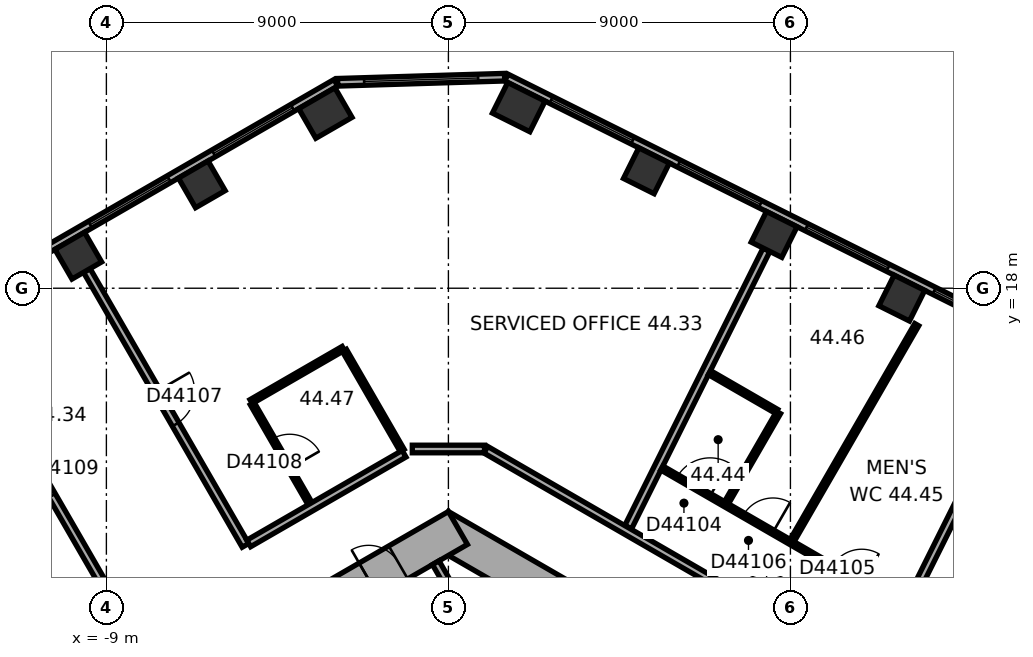
"""IFC4 building model, lengths in metres.
Left out: names, types, materials, properties, quantities, classifications, styles, units other than length and angle.
Written with IfcOpenShell. Run it as: python <this file> out.ifc"""

import sys

from ifc_helpers import new_model, si_unit, direction, frame, frame_2d, origin, origin_2d, place, context, subcontext, project, spatial, rectangle, extrude, element, fill, save


model = new_model("IFC4")
c1 = context("Model", 3, precision=1e-05, world=origin(), true_north=direction((0.0, 1.0)))
c2 = subcontext(c1, "Body", "Model", "MODEL_VIEW")
j1 = project(units=[si_unit("LENGTHUNIT", "METRE"), si_unit("PLANEANGLEUNIT", "RADIAN")], contexts=[c1])
p1 = place(None, origin())
s1 = spatial("IfcSite", under=j1, at=p1, CompositionType="ELEMENT")
p2 = place(p1, origin())
s2 = spatial("IfcBuilding", under=s1, at=p2, CompositionType="ELEMENT")
p3 = place(p2, frame((0.0, 0.0, 179.9)))
s3 = spatial("IfcBuildingStorey", under=s2, at=p3, CompositionType="ELEMENT", Elevation=179.9)
for number, where, z_axis, x_axis in (
    (1, (11.931, 17.74, 0.0), (0.0, 0.0, 1.0), (-0.895, 0.446, 0.0)),
    (2, (8.571, 19.416, 0.0), (0.0, 0.0, 1.0), (-0.895, 0.446, 0.0)),
    (3, (5.211, 21.091, 0.0), (0.0, 0.0, 1.0), (-0.895, 0.446, 0.0)),
):
    element("IfcColumn", number, at=place(p3, frame(where, z_axis=z_axis, x_axis=x_axis)), inside=s3, PredefinedType="COLUMN", context=c2, shape_type="SweptSolid", body=[
        extrude(rectangle(XDim=0.9, YDim=0.9, at=origin_2d()), origin(), (0.0, 0.0, 1.0), 3.7),
    ])
for number, where, z_axis, x_axis in (
    (4, (1.852, 22.766, 0.0), (0.0, 0.0, 1.0), (-0.895, 0.446, 0.0)),
    (5, (-3.238, 22.61, 0.0), (0.0, 0.0, 1.0), (-0.866, -0.5, 0.0)),
):
    element("IfcColumn", number, at=place(p3, frame(where, z_axis=z_axis, x_axis=x_axis)), inside=s3, PredefinedType="COLUMN", context=c2, shape_type="SweptSolid", body=[
        extrude(rectangle(XDim=1.1, YDim=0.9, at=origin_2d()), origin(), (0.0, 0.0, 1.0), 3.7),
    ])
for number, where, z_axis, x_axis in (
    (6, (-6.489, 20.733, 0.0), (0.0, 0.0, 1.0), (-0.866, -0.5, 0.0)),
    (7, (-9.74, 18.856, 0.0), (0.0, 0.0, 1.0), (-0.866, -0.5, 0.0)),
):
    element("IfcColumn", number, at=place(p3, frame(where, z_axis=z_axis, x_axis=x_axis)), inside=s3, PredefinedType="COLUMN", context=c2, shape_type="SweptSolid", body=[
        extrude(rectangle(XDim=0.9, YDim=0.9, at=origin_2d()), origin(), (0.0, 0.0, 1.0), 3.7),
    ])
p4 = place(p3, frame((10.25, 5.629, 0.0), z_axis=(0.0, 0.0, 1.0), x_axis=(-0.866022616891, 0.50000482701, 0.0)))
e8 = element("IfcWall", 8, at=p4, inside=s3, PredefinedType="SHEAR", context=c2, shape_type="SweptSolid", body=[
    extrude(rectangle(XDim=12.125, YDim=1.0, at=frame_2d((6.062, 0.0))), origin(), (0.0, 0.0, 1.0), 3.7),
])
p5 = place(p4, frame((5.312, 0.0, 0.0)))
e9 = element("IfcOpeningElement", 9, at=p5, cuts=e8, PredefinedType="OPENING", context=c2, shape_type="SweptSolid", body=[
    extrude(rectangle(XDim=0.9, YDim=2.1, at=frame_2d((0.45, 1.05))), frame((0.0, 0.51, 0.0), z_axis=(0.0, -1.0, 0.0), x_axis=(1.0, 0.0, 0.0)), (0.0, 0.0, 1.0), 1.02),
])
p6 = place(p3, frame((0.25, 11.691, 0.0), z_axis=(0.0, 0.0, 1.0), x_axis=(-0.866022616891, -0.50000482701, 0.0)))
e10 = element("IfcWall", 10, at=p6, inside=s3, PredefinedType="SHEAR", context=c2, shape_type="SweptSolid", body=[
    extrude(rectangle(XDim=12.125, YDim=1.0, at=frame_2d((6.062, 0.0))), origin(), (0.0, 0.0, 1.0), 3.7),
])
p7 = place(p6, frame((6.262, 0.0, 0.0)))
e11 = element("IfcOpeningElement", 11, at=p7, cuts=e10, PredefinedType="OPENING", context=c2, shape_type="SweptSolid", body=[
    extrude(rectangle(XDim=1.5, YDim=2.1, at=frame_2d((0.75, 1.05))), frame((0.0, 0.51, 0.0), z_axis=(0.0, -1.0, 0.0), x_axis=(1.0, 0.0, 0.0)), (0.0, 0.0, 1.0), 1.02),
])
p8 = place(p6, frame((1.812, 0.0, 0.0)))
e12 = element("IfcOpeningElement", 12, at=p8, cuts=e10, PredefinedType="OPENING", context=c2, shape_type="SweptSolid", body=[
    extrude(rectangle(XDim=0.9, YDim=2.1, at=frame_2d((0.45, 1.05))), frame((0.0, 0.51, 0.0), z_axis=(0.0, -1.0, 0.0), x_axis=(1.0, 0.0, 0.0)), (0.0, 0.0, 1.0), 1.02),
])
p9 = place(p6, frame((4.412, 0.0, 0.0)))
e13 = element("IfcOpeningElement", 13, at=p9, cuts=e10, PredefinedType="OPENING", context=c2, shape_type="SweptSolid", body=[
    extrude(rectangle(XDim=0.9, YDim=2.1, at=frame_2d((0.45, 1.05))), frame((0.0, 0.51, 0.0), z_axis=(0.0, -1.0, 0.0), x_axis=(1.0, 0.0, 0.0)), (0.0, 0.0, 1.0), 1.02),
])
p10 = place(p3, frame((19.464, 14.599, 0.0), z_axis=(0.0, 0.0, 1.0), x_axis=(-0.894935755043, 0.446195018289, 0.0)))
e14 = element("IfcWall", 14, at=p10, inside=s3, PredefinedType="STANDARD", context=c2, shape_type="SweptSolid", body=[
    extrude(rectangle(XDim=20.044, YDim=0.2, at=frame_2d((10.022, 0.0))), origin(), (0.0, 0.0, 1.0), 3.7),
])
p11 = place(p10, frame((1.313, 0.0, 0.9)))
e15 = element("IfcOpeningElement", 15, at=p11, cuts=e14, PredefinedType="OPENING", context=c2, shape_type="SweptSolid", body=[
    extrude(rectangle(XDim=2.4, YDim=2.0, at=frame_2d((1.2, 1.0))), frame((0.0, 0.11, 0.0), z_axis=(0.0, -1.0, 0.0), x_axis=(1.0, 0.0, 0.0)), (0.0, 0.0, 1.0), 0.22),
])
p12 = place(p10, frame((5.067, 0.0, 0.9)))
e16 = element("IfcOpeningElement", 16, at=p12, cuts=e14, PredefinedType="OPENING", context=c2, shape_type="SweptSolid", body=[
    extrude(rectangle(XDim=2.4, YDim=2.0, at=frame_2d((1.2, 1.0))), frame((0.0, 0.11, 0.0), z_axis=(0.0, -1.0, 0.0), x_axis=(1.0, 0.0, 0.0)), (0.0, 0.0, 1.0), 0.22),
])
p13 = place(p10, frame((8.821, 0.0, 0.9)))
e17 = element("IfcOpeningElement", 17, at=p13, cuts=e14, PredefinedType="OPENING", context=c2, shape_type="SweptSolid", body=[
    extrude(rectangle(XDim=2.4, YDim=2.0, at=frame_2d((1.2, 1.0))), frame((0.0, 0.11, 0.0), z_axis=(0.0, -1.0, 0.0), x_axis=(1.0, 0.0, 0.0)), (0.0, 0.0, 1.0), 0.22),
])
p14 = place(p10, frame((12.575, 0.0, 0.9)))
e18 = element("IfcOpeningElement", 18, at=p14, cuts=e14, PredefinedType="OPENING", context=c2, shape_type="SweptSolid", body=[
    extrude(rectangle(XDim=2.4, YDim=2.0, at=frame_2d((1.2, 1.0))), frame((0.0, 0.11, 0.0), z_axis=(0.0, -1.0, 0.0), x_axis=(1.0, 0.0, 0.0)), (0.0, 0.0, 1.0), 0.22),
])
p15 = place(p10, frame((16.329, 0.0, 0.9)))
e19 = element("IfcOpeningElement", 19, at=p15, cuts=e14, PredefinedType="OPENING", context=c2, shape_type="SweptSolid", body=[
    extrude(rectangle(XDim=2.4, YDim=2.0, at=frame_2d((1.2, 1.0))), frame((0.0, 0.11, 0.0), z_axis=(0.0, -1.0, 0.0), x_axis=(1.0, 0.0, 0.0)), (0.0, 0.0, 1.0), 0.22),
])
p16 = place(p3, frame((1.479, 23.553, 0.0), z_axis=(0.0, 0.0, 1.0), x_axis=(-0.999534786117, -0.03049936625, 0.0)))
e20 = element("IfcWall", 20, at=p16, inside=s3, PredefinedType="STANDARD", context=c2, shape_type="SweptSolid", body=[
    extrude(rectangle(XDim=4.395, YDim=0.2, at=frame_2d((2.197, 0.0))), origin(), (0.0, 0.0, 1.0), 3.7),
])
p17 = place(p16, frame((0.698, 0.0, 0.9)))
e21 = element("IfcOpeningElement", 21, at=p17, cuts=e20, PredefinedType="OPENING", context=c2, shape_type="SweptSolid", body=[
    extrude(rectangle(XDim=3.0, YDim=2.0, at=frame_2d((1.5, 1.0))), frame((0.0, 0.11, 0.0), z_axis=(0.0, -1.0, 0.0), x_axis=(1.0, 0.0, 0.0)), (0.0, 0.0, 1.0), 0.22),
])
p18 = place(p3, frame((-2.961, 23.405, 0.0), z_axis=(0.0, 0.0, 1.0), x_axis=(-0.866023315909, -0.500003616288, 0.0)))
e22 = element("IfcWall", 22, at=p18, inside=s3, PredefinedType="STANDARD", context=c2, shape_type="SweptSolid", body=[
    extrude(rectangle(XDim=20.044, YDim=0.2, at=frame_2d((10.022, 0.0))), origin(), (0.0, 0.0, 1.0), 3.7),
])
p19 = place(p18, frame((1.314, 0.0, 0.9)))
e23 = element("IfcOpeningElement", 23, at=p19, cuts=e22, PredefinedType="OPENING", context=c2, shape_type="SweptSolid", body=[
    extrude(rectangle(XDim=2.4, YDim=2.0, at=frame_2d((1.2, 1.0))), frame((0.0, 0.11, 0.0), z_axis=(0.0, -1.0, 0.0), x_axis=(1.0, 0.0, 0.0)), (0.0, 0.0, 1.0), 0.22),
])
p20 = place(p18, frame((5.069, 0.0, 0.9)))
e24 = element("IfcOpeningElement", 24, at=p20, cuts=e22, PredefinedType="OPENING", context=c2, shape_type="SweptSolid", body=[
    extrude(rectangle(XDim=2.4, YDim=2.0, at=frame_2d((1.2, 1.0))), frame((0.0, 0.11, 0.0), z_axis=(0.0, -1.0, 0.0), x_axis=(1.0, 0.0, 0.0)), (0.0, 0.0, 1.0), 0.22),
])
p21 = place(p18, frame((8.823, 0.0, 0.9)))
e25 = element("IfcOpeningElement", 25, at=p21, cuts=e22, PredefinedType="OPENING", context=c2, shape_type="SweptSolid", body=[
    extrude(rectangle(XDim=2.4, YDim=2.0, at=frame_2d((1.2, 1.0))), frame((0.0, 0.11, 0.0), z_axis=(0.0, -1.0, 0.0), x_axis=(1.0, 0.0, 0.0)), (0.0, 0.0, 1.0), 0.22),
])
p22 = place(p18, frame((12.577, 0.0, 0.9)))
e26 = element("IfcOpeningElement", 26, at=p22, cuts=e22, PredefinedType="OPENING", context=c2, shape_type="SweptSolid", body=[
    extrude(rectangle(XDim=2.4, YDim=2.0, at=frame_2d((1.2, 1.0))), frame((0.0, 0.11, 0.0), z_axis=(0.0, -1.0, 0.0), x_axis=(1.0, 0.0, 0.0)), (0.0, 0.0, 1.0), 0.22),
])
p23 = place(p18, frame((16.331, 0.0, 0.9)))
e27 = element("IfcOpeningElement", 27, at=p23, cuts=e22, PredefinedType="OPENING", context=c2, shape_type="SweptSolid", body=[
    extrude(rectangle(XDim=2.4, YDim=2.0, at=frame_2d((1.2, 1.0))), frame((0.0, 0.11, 0.0), z_axis=(0.0, -1.0, 0.0), x_axis=(1.0, 0.0, 0.0)), (0.0, 0.0, 1.0), 0.22),
])
p24 = place(p3, frame((0.767, 8.872, 0.0), z_axis=(0.0, 0.0, 1.0), x_axis=(-0.499994660107, 0.866028486751, 0.0)))
e28 = element("IfcWall", 28, at=p24, inside=s3, PredefinedType="PARTITIONING", context=c2, shape_type="SweptSolid", body=[
    extrude(rectangle(XDim=2.2, YDim=0.2, at=frame_2d((1.1, 0.0))), origin(), (0.0, 0.0, 1.0), 3.42),
])
p25 = place(p3, frame((-12.766, 16.589, 0.0), z_axis=(0.0, 0.0, 1.0), x_axis=(0.500010139422, -0.866019549707, 0.0)))
e29 = element("IfcWall", 29, at=p25, inside=s3, PredefinedType="PARTITIONING", context=c2, shape_type="SweptSolid", body=[
    extrude(rectangle(XDim=8.35, YDim=0.2, at=frame_2d((4.175, 0.0))), origin(), (0.0, 0.0, 1.0), 3.42),
])
p26 = place(p25, frame((3.675, 0.0, 0.0)))
e30 = element("IfcOpeningElement", 30, at=p26, cuts=e29, PredefinedType="OPENING", context=c2, shape_type="SweptSolid", body=[
    extrude(rectangle(XDim=1.0, YDim=2.1, at=frame_2d((0.5, 1.05))), frame((0.0, 0.11, 0.0), z_axis=(0.0, -1.0, 0.0), x_axis=(1.0, 0.0, 0.0)), (0.0, 0.0, 1.0), 0.22),
])
p27 = place(p3, frame((-9.515, 18.466, 0.0), z_axis=(0.0, 0.0, 1.0), x_axis=(0.500010139422, -0.866019549707, 0.0)))
e31 = element("IfcWall", 31, at=p27, inside=s3, PredefinedType="PARTITIONING", context=c2, shape_type="SweptSolid", body=[
    extrude(rectangle(XDim=8.35, YDim=0.2, at=frame_2d((4.175, 0.0))), origin(), (0.0, 0.0, 1.0), 2.87),
])
p28 = place(p27, frame((3.675, 0.0, 0.0)))
e32 = element("IfcOpeningElement", 32, at=p28, cuts=e31, PredefinedType="OPENING", context=c2, shape_type="SweptSolid", body=[
    extrude(rectangle(XDim=1.0, YDim=2.1, at=frame_2d((0.5, 1.05))), frame((0.0, 0.11, 0.0), z_axis=(0.0, -1.0, 0.0), x_axis=(1.0, 0.0, 0.0)), (0.0, 0.0, 1.0), 0.22),
])
p29 = place(p3, frame((-5.191, 15.016, 0.0), z_axis=(0.0, 0.0, 1.0), x_axis=(0.866034573852, 0.49998411664, 0.0)))
e33 = element("IfcWall", 33, at=p29, inside=s3, PredefinedType="PARTITIONING", context=c2, shape_type="SweptSolid", body=[
    extrude(rectangle(XDim=2.8, YDim=0.12, at=frame_2d((1.4, 0.0))), origin(), (0.0, 0.0, 1.0), 3.42),
])
p30 = place(p3, frame((-3.641, 12.331, 0.0), z_axis=(0.0, 0.0, 1.0), x_axis=(-0.499991248344, 0.866030456496, 0.0)))
e34 = element("IfcWall", 34, at=p30, inside=s3, PredefinedType="PARTITIONING", context=c2, shape_type="SweptSolid", body=[
    extrude(rectangle(XDim=3.04, YDim=0.12, at=frame_2d((1.52, 0.0))), origin(), (0.0, 0.0, 1.0), 3.42),
])
p31 = place(p30, frame((1.07, 0.0, 0.0)))
e35 = element("IfcOpeningElement", 35, at=p31, cuts=e34, PredefinedType="OPENING", context=c2, shape_type="SweptSolid", body=[
    extrude(rectangle(XDim=0.9, YDim=2.1, at=frame_2d((0.45, 1.05))), frame((0.0, 0.07, 0.0), z_axis=(0.0, -1.0, 0.0), x_axis=(1.0, 0.0, 0.0)), (0.0, 0.0, 1.0), 0.14),
])
p32 = place(p3, frame((-2.737, 16.364, 0.0), z_axis=(0.0, 0.0, 1.0), x_axis=(0.500026023896, -0.86601037836, 0.0)))
e36 = element("IfcWall", 36, at=p32, inside=s3, PredefinedType="PARTITIONING", context=c2, shape_type="SweptSolid", body=[
    extrude(rectangle(XDim=3.04, YDim=0.12, at=frame_2d((1.52, 0.0))), origin(), (0.0, 0.0, 1.0), 3.42),
])
p33 = place(p3, frame((-1.167, 13.645, 0.0), z_axis=(0.0, 0.0, 1.0), x_axis=(-0.866034830959, -0.499983671299, 0.0)))
e37 = element("IfcWall", 37, at=p33, inside=s3, PredefinedType="PARTITIONING", context=c2, shape_type="SweptSolid", body=[
    extrude(rectangle(XDim=4.719, YDim=0.2, at=frame_2d((2.36, 0.0))), origin(), (0.0, 0.0, 1.0), 3.42),
])
p34 = place(p3, frame((0.95, 13.77, 0.0), z_axis=(0.0, 0.0, 1.0), x_axis=(-1.0, 0.0, 0.0)))
e38 = element("IfcWall", 38, at=p34, inside=s3, PredefinedType="PARTITIONING", context=c2, shape_type="SweptSolid", body=[
    extrude(rectangle(XDim=1.9, YDim=0.2, at=frame_2d((0.95, 0.0))), origin(), (0.0, 0.0, 1.0), 3.42),
])
p35 = place(p3, frame((7.318, 12.356, 0.0), z_axis=(0.0, 0.0, 1.0), x_axis=(0.499982138324, 0.866035715982, 0.0)))
e39 = element("IfcWall", 39, at=p35, inside=s3, PredefinedType="PARTITIONING", context=c2, shape_type="SweptSolid", body=[
    extrude(rectangle(XDim=2.74, YDim=0.12, at=frame_2d((1.37, 0.0))), origin(), (0.0, 0.0, 1.0), 3.42),
])
p36 = place(p3, frame((8.37, 19.013, 0.0), z_axis=(0.0, 0.0, 1.0), x_axis=(-0.446183598632, -0.894941448538, 0.0)))
e40 = element("IfcWall", 40, at=p36, inside=s3, PredefinedType="PARTITIONING", context=c2, shape_type="SweptSolid", body=[
    extrude(rectangle(XDim=8.156, YDim=0.2, at=frame_2d((4.078, 0.0))), origin(), (0.0, 0.0, 1.0), 3.42),
])
p37 = place(p3, frame((8.636, 14.759, 0.0), z_axis=(0.0, 0.0, 1.0), x_axis=(-0.866010195725, 0.500026340207, 0.0)))
e41 = element("IfcWall", 41, at=p37, inside=s3, PredefinedType="PARTITIONING", context=c2, shape_type="SweptSolid", body=[
    extrude(rectangle(XDim=2.04, YDim=0.12, at=frame_2d((1.02, 0.0))), origin(), (0.0, 0.0, 1.0), 3.42),
])
p38 = place(p3, frame((11.196, 7.854, 0.0), z_axis=(0.0, 0.0, 1.0), x_axis=(-0.866023877043, 0.500002644385, 0.0)))
e42 = element("IfcWall", 42, at=p38, inside=s3, PredefinedType="PARTITIONING", context=c2, shape_type="SweptSolid", body=[
    extrude(rectangle(XDim=11.792, YDim=0.2, at=frame_2d((5.896, 0.0))), origin(), (0.0, 0.0, 1.0), 3.42),
])
p39 = place(p38, frame((3.261, 0.0, 0.0)))
e43 = element("IfcOpeningElement", 43, at=p39, cuts=e42, PredefinedType="OPENING", context=c2, shape_type="SweptSolid", body=[
    extrude(rectangle(XDim=1.0, YDim=2.1, at=frame_2d((0.5, 1.05))), frame((0.0, 0.11, 0.0), z_axis=(0.0, -1.0, 0.0), x_axis=(1.0, 0.0, 0.0)), (0.0, 0.0, 1.0), 0.22),
])
p40 = place(p3, frame((11.959, 9.608, 0.0), z_axis=(0.0, 0.0, 1.0), x_axis=(-0.866018452427, 0.500012039911, 0.0)))
e44 = element("IfcWall", 44, at=p40, inside=s3, PredefinedType="PARTITIONING", context=c2, shape_type="SweptSolid", body=[
    extrude(rectangle(XDim=7.322, YDim=0.12, at=frame_2d((3.661, 0.0))), origin(), (0.0, 0.0, 1.0), 3.42),
])
p41 = place(p40, frame((5.858, 0.0, 0.0)))
e45 = element("IfcOpeningElement", 45, at=p41, cuts=e44, PredefinedType="OPENING", context=c2, shape_type="SweptSolid", body=[
    extrude(rectangle(XDim=1.0, YDim=2.1, at=frame_2d((0.5, 1.05))), frame((0.0, 0.07, 0.0), z_axis=(0.0, -1.0, 0.0), x_axis=(1.0, 0.0, 0.0)), (0.0, 0.0, 1.0), 0.14),
])
p42 = place(p40, frame((1.25, 0.0, 0.0)))
e46 = element("IfcOpeningElement", 46, at=p42, cuts=e44, PredefinedType="OPENING", context=c2, shape_type="SweptSolid", body=[
    extrude(rectangle(XDim=0.9, YDim=2.1, at=frame_2d((0.45, 1.05))), frame((0.0, 0.07, 0.0), z_axis=(0.0, -1.0, 0.0), x_axis=(1.0, 0.0, 0.0)), (0.0, 0.0, 1.0), 0.14),
])
p43 = place(p40, frame((3.947, 0.0, 0.0)))
e47 = element("IfcOpeningElement", 47, at=p43, cuts=e44, PredefinedType="OPENING", context=c2, shape_type="SweptSolid", body=[
    extrude(rectangle(XDim=0.9, YDim=2.1, at=frame_2d((0.45, 1.05))), frame((0.0, 0.07, 0.0), z_axis=(0.0, -1.0, 0.0), x_axis=(1.0, 0.0, 0.0)), (0.0, 0.0, 1.0), 0.14),
])
p44 = place(p3, frame((12.325, 17.041, 0.0), z_axis=(0.0, 0.0, 1.0), x_axis=(-0.499985538654, -0.866033752885, 0.0)))
e48 = element("IfcWall", 48, at=p44, inside=s3, PredefinedType="PARTITIONING", context=c2, shape_type="SweptSolid", body=[
    extrude(rectangle(XDim=6.56, YDim=0.12, at=frame_2d((3.28, 0.0))), origin(), (0.0, 0.0, 1.0), 3.42),
])
p45 = place(p3, frame((15.09, 15.663, 0.0), z_axis=(0.0, 0.0, 1.0), x_axis=(-0.446204491029, -0.894931032083, 0.0)))
e49 = element("IfcWall", 49, at=p45, inside=s3, PredefinedType="PARTITIONING", context=c2, shape_type="SweptSolid", body=[
    extrude(rectangle(XDim=8.615, YDim=0.2, at=frame_2d((4.308, 0.0))), origin(), (0.0, 0.0, 1.0), 3.42),
])
p46 = place(p12, origin())
e50 = element("IfcWindow", 50, at=p46, inside=s3, PartitioningType="SINGLE_PANEL", PredefinedType="WINDOW", context=c2, shape_type="SweptSolid", body=[
    extrude(rectangle(XDim=2.4, YDim=2.0, at=frame_2d((1.2, 1.0))), frame((0.0, 0.03, 0.0), z_axis=(0.0, -1.0, 0.0), x_axis=(1.0, 0.0, 0.0)), (0.0, 0.0, 1.0), 0.06),
])
fill(e16, e50)
p47 = place(p13, origin())
e51 = element("IfcWindow", 51, at=p47, inside=s3, PartitioningType="SINGLE_PANEL", PredefinedType="WINDOW", context=c2, shape_type="SweptSolid", body=[
    extrude(rectangle(XDim=2.4, YDim=2.0, at=frame_2d((1.2, 1.0))), frame((0.0, 0.03, 0.0), z_axis=(0.0, -1.0, 0.0), x_axis=(1.0, 0.0, 0.0)), (0.0, 0.0, 1.0), 0.06),
])
fill(e17, e51)
p48 = place(p14, origin())
e52 = element("IfcWindow", 52, at=p48, inside=s3, PartitioningType="SINGLE_PANEL", PredefinedType="WINDOW", context=c2, shape_type="SweptSolid", body=[
    extrude(rectangle(XDim=2.4, YDim=2.0, at=frame_2d((1.2, 1.0))), frame((0.0, 0.03, 0.0), z_axis=(0.0, -1.0, 0.0), x_axis=(1.0, 0.0, 0.0)), (0.0, 0.0, 1.0), 0.06),
])
fill(e18, e52)
p49 = place(p15, origin())
e53 = element("IfcWindow", 53, at=p49, inside=s3, PartitioningType="SINGLE_PANEL", PredefinedType="WINDOW", context=c2, shape_type="SweptSolid", body=[
    extrude(rectangle(XDim=2.4, YDim=2.0, at=frame_2d((1.2, 1.0))), frame((0.0, 0.03, 0.0), z_axis=(0.0, -1.0, 0.0), x_axis=(1.0, 0.0, 0.0)), (0.0, 0.0, 1.0), 0.06),
])
fill(e19, e53)
p50 = place(p17, origin())
e54 = element("IfcWindow", 54, at=p50, inside=s3, PartitioningType="SINGLE_PANEL", PredefinedType="WINDOW", context=c2, shape_type="SweptSolid", body=[
    extrude(rectangle(XDim=3.0, YDim=2.0, at=frame_2d((1.5, 1.0))), frame((0.0, 0.03, 0.0), z_axis=(0.0, -1.0, 0.0), x_axis=(1.0, 0.0, 0.0)), (0.0, 0.0, 1.0), 0.06),
])
fill(e21, e54)
p51 = place(p19, origin())
e55 = element("IfcWindow", 55, at=p51, inside=s3, PartitioningType="SINGLE_PANEL", PredefinedType="WINDOW", context=c2, shape_type="SweptSolid", body=[
    extrude(rectangle(XDim=2.4, YDim=2.0, at=frame_2d((1.2, 1.0))), frame((0.0, 0.03, 0.0), z_axis=(0.0, -1.0, 0.0), x_axis=(1.0, 0.0, 0.0)), (0.0, 0.0, 1.0), 0.06),
])
fill(e23, e55)
p52 = place(p20, origin())
e56 = element("IfcWindow", 56, at=p52, inside=s3, PartitioningType="SINGLE_PANEL", PredefinedType="WINDOW", context=c2, shape_type="SweptSolid", body=[
    extrude(rectangle(XDim=2.4, YDim=2.0, at=frame_2d((1.2, 1.0))), frame((0.0, 0.03, 0.0), z_axis=(0.0, -1.0, 0.0), x_axis=(1.0, 0.0, 0.0)), (0.0, 0.0, 1.0), 0.06),
])
fill(e24, e56)
p53 = place(p8, origin())
e57 = element("IfcDoor", 57, at=p53, inside=s3, OperationType="SINGLE_SWING_LEFT", PredefinedType="DOOR", context=c2, shape_type="SweptSolid", body=[
    extrude(rectangle(XDim=0.9, YDim=2.1, at=frame_2d((0.45, 1.05))), frame((0.0, 0.025, 0.0), z_axis=(0.0, -1.0, 0.0), x_axis=(1.0, 0.0, 0.0)), (0.0, 0.0, 1.0), 0.05),
])
fill(e12, e57)
p54 = place(p41, origin())
e58 = element("IfcDoor", 58, at=p54, inside=s3, OperationType="SINGLE_SWING_LEFT", PredefinedType="DOOR", context=c2, shape_type="SweptSolid", body=[
    extrude(rectangle(XDim=1.0, YDim=2.1, at=frame_2d((0.5, 1.05))), frame((0.0, 0.025, 0.0), z_axis=(0.0, -1.0, 0.0), x_axis=(1.0, 0.0, 0.0)), (0.0, 0.0, 1.0), 0.05),
])
fill(e45, e58)
p55 = place(p42, origin())
e59 = element("IfcDoor", 59, at=p55, inside=s3, OperationType="SINGLE_SWING_LEFT", PredefinedType="DOOR", context=c2, shape_type="SweptSolid", body=[
    extrude(rectangle(XDim=0.9, YDim=2.1, at=frame_2d((0.45, 1.05))), frame((0.0, 0.025, 0.0), z_axis=(0.0, -1.0, 0.0), x_axis=(1.0, 0.0, 0.0)), (0.0, 0.0, 1.0), 0.05),
])
fill(e46, e59)
p56 = place(p43, origin())
e60 = element("IfcDoor", 60, at=p56, inside=s3, OperationType="SINGLE_SWING_LEFT", PredefinedType="DOOR", context=c2, shape_type="SweptSolid", body=[
    extrude(rectangle(XDim=0.9, YDim=2.1, at=frame_2d((0.45, 1.05))), frame((0.0, 0.025, 0.0), z_axis=(0.0, -1.0, 0.0), x_axis=(1.0, 0.0, 0.0)), (0.0, 0.0, 1.0), 0.05),
])
fill(e47, e60)
p57 = place(p28, origin())
e61 = element("IfcDoor", 61, at=p57, inside=s3, OperationType="SINGLE_SWING_LEFT", PredefinedType="DOOR", context=c2, shape_type="SweptSolid", body=[
    extrude(rectangle(XDim=1.0, YDim=2.1, at=frame_2d((0.5, 1.05))), frame((0.0, 0.025, 0.0), z_axis=(0.0, -1.0, 0.0), x_axis=(1.0, 0.0, 0.0)), (0.0, 0.0, 1.0), 0.05),
])
fill(e32, e61)
p58 = place(p31, origin())
e62 = element("IfcDoor", 62, at=p58, inside=s3, OperationType="SINGLE_SWING_LEFT", PredefinedType="DOOR", context=c2, shape_type="SweptSolid", body=[
    extrude(rectangle(XDim=0.9, YDim=2.1, at=frame_2d((0.45, 1.05))), frame((0.0, 0.025, 0.0), z_axis=(0.0, -1.0, 0.0), x_axis=(1.0, 0.0, 0.0)), (0.0, 0.0, 1.0), 0.05),
])
fill(e35, e62)
p59 = place(p26, origin())
e63 = element("IfcDoor", 63, at=p59, inside=s3, OperationType="SINGLE_SWING_LEFT", PredefinedType="DOOR", context=c2, shape_type="SweptSolid", body=[
    extrude(rectangle(XDim=1.0, YDim=2.1, at=frame_2d((0.5, 1.05))), frame((0.0, 0.025, 0.0), z_axis=(0.0, -1.0, 0.0), x_axis=(1.0, 0.0, 0.0)), (0.0, 0.0, 1.0), 0.05),
])
fill(e30, e63)
save(model, sys.argv[1])
